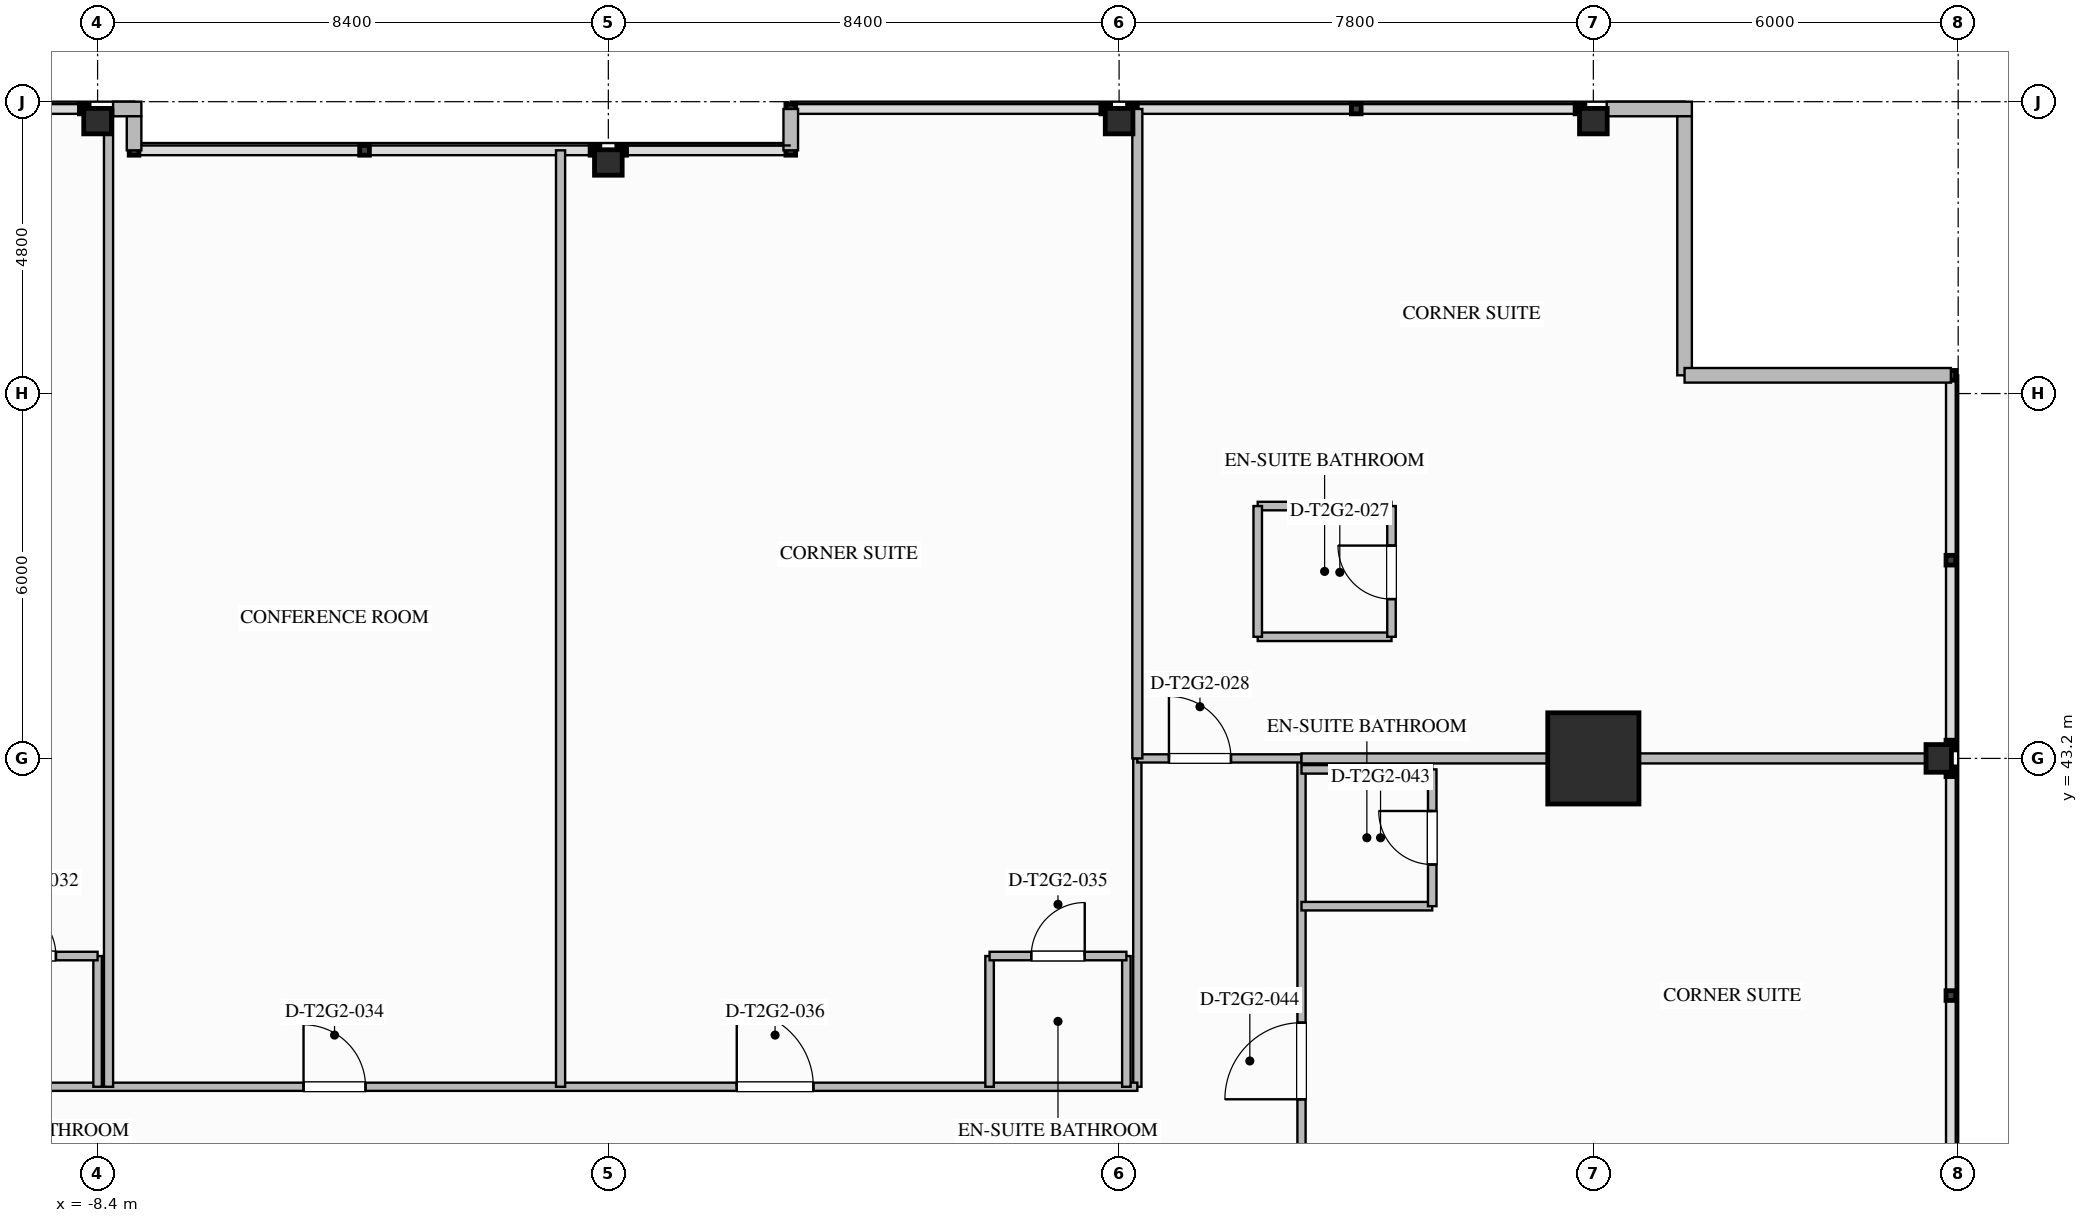
"""IFC4 building model, lengths in metres.
Left out: names, types, materials, properties, quantities, classifications, styles, units other than length and angle.
Written with IfcOpenShell. Run it as: python <this file> out.ifc"""

import sys

from ifc_helpers import new_model, si_unit, direction, frame, frame_2d, origin, origin_2d, place, context, subcontext, project, spatial, rectangle, i_section, extrude, element, fill, save


model = new_model("IFC4")
c1 = context("Model", 3, precision=1e-05, world=origin(), true_north=direction((0.0, 1.0)))
c2 = subcontext(c1, "Body", "Model", "MODEL_VIEW")
j1 = project(units=[si_unit("LENGTHUNIT", "METRE"), si_unit("PLANEANGLEUNIT", "RADIAN")], contexts=[c1])
p1 = place(None, origin())
s1 = spatial("IfcSite", under=j1, at=p1, CompositionType="ELEMENT")
p2 = place(p1, origin())
s2 = spatial("IfcBuilding", under=s1, at=p2, CompositionType="ELEMENT")
p3 = place(p2, frame((0.0, 0.0, 102.3)))
s3 = spatial("IfcBuildingStorey", under=s2, at=p3, CompositionType="ELEMENT", Elevation=102.3)
p4 = place(p3, frame((16.2, 43.2, 0.0), z_axis=(0.0, 0.0, 1.0), x_axis=(1.0, 0.0, 0.0)))
e1 = element("IfcColumn", 1, at=p4, inside=s3, PredefinedType="COLUMN", context=c2, shape_type="SweptSolid", body=[
    extrude(rectangle(XDim=1.5, YDim=1.5, at=origin_2d()), origin(), (0.0, 0.0, 1.0), 3.5),
])
for number, where, z_axis, x_axis in (
    (2, (21.88, 43.2, 0.0), (0.0, 0.0, 1.0), (1.0, 0.0, 0.0)),
    (3, (-8.4, 53.68, 0.0), (0.0, 0.0, 1.0), (0.0, 1.0, 0.0)),
    (4, (0.0, 53.0, 0.0), (0.0, 0.0, 1.0), (0.0, 1.0, 0.0)),
    (5, (8.4, 53.68, 0.0), (0.0, 0.0, 1.0), (0.0, 1.0, 0.0)),
    (6, (16.2, 53.68, 0.0), (0.0, 0.0, 1.0), (0.0, 1.0, 0.0)),
):
    element("IfcColumn", number, at=place(p3, frame(where, z_axis=z_axis, x_axis=x_axis)), inside=s3, PredefinedType="COLUMN", context=c2, shape_type="SweptSolid", body=[
        extrude(i_section(OverallWidth=0.418, OverallDepth=0.455, WebThickness=0.042, FlangeThickness=0.068, FilletRadius=0.03, at=origin_2d()), origin(), (0.0, 0.0, 1.0), 3.497),
    ])
p5 = place(p3, frame((-8.145, 53.88, 0.0), z_axis=(0.0, 0.0, 1.0), x_axis=(1.0, 0.0, 0.0)))
e7 = element("IfcWall", 7, at=p5, inside=s3, PredefinedType="STANDARD", context=c2, shape_type="SweptSolid", body=[
    extrude(rectangle(XDim=0.465, YDim=0.24, at=frame_2d((0.232, 0.0))), origin(), (0.0, 0.0, 1.0), 3.24),
])
p6 = place(p3, frame((16.42, 53.88, 0.0), z_axis=(0.0, 0.0, 1.0), x_axis=(1.0, 0.0, 0.0)))
e8 = element("IfcWall", 8, at=p6, inside=s3, PredefinedType="STANDARD", context=c2, shape_type="SweptSolid", body=[
    extrude(rectangle(XDim=1.4, YDim=0.24, at=frame_2d((0.7, 0.0))), origin(), (0.0, 0.0, 1.0), 3.24),
])
p7 = place(p3, frame((17.7, 53.76, 0.0), z_axis=(0.0, 0.0, 1.0), x_axis=(0.0, -1.0, 0.0)))
e9 = element("IfcWall", 9, at=p7, inside=s3, PredefinedType="STANDARD", context=c2, shape_type="SweptSolid", body=[
    extrude(rectangle(XDim=4.26, YDim=0.24, at=frame_2d((2.13, 0.0))), origin(), (0.0, 0.0, 1.0), 3.24),
])
p8 = place(p3, frame((17.7, 49.5, 0.0), z_axis=(0.0, 0.0, 1.0), x_axis=(1.0, 0.0, 0.0)))
e10 = element("IfcWall", 10, at=p8, inside=s3, PredefinedType="STANDARD", context=c2, shape_type="SweptSolid", body=[
    extrude(rectangle(XDim=4.38, YDim=0.24, at=frame_2d((2.19, 0.0))), origin(), (0.0, 0.0, 1.0), 3.24),
])
p9 = place(p3, frame((-7.8, 53.76, 0.0), z_axis=(0.0, 0.0, 1.0), x_axis=(0.0, -1.0, 0.0)))
e11 = element("IfcWall", 11, at=p9, inside=s3, PredefinedType="STANDARD", context=c2, shape_type="SweptSolid", body=[
    extrude(rectangle(XDim=0.56, YDim=0.24, at=frame_2d((0.28, 0.0))), origin(), (0.0, 0.0, 1.0), 3.24),
])
p10 = place(p3, frame((3.0, 53.2, 0.0), z_axis=(0.0, 0.0, 1.0), x_axis=(0.0, 1.0, 0.0)))
e12 = element("IfcWall", 12, at=p10, inside=s3, PredefinedType="STANDARD", context=c2, shape_type="SweptSolid", body=[
    extrude(rectangle(XDim=0.68, YDim=0.24, at=frame_2d((0.34, 0.0))), origin(), (0.0, 0.0, 1.0), 3.24),
])
p11 = place(p3, frame((8.7, 37.8, 0.0), z_axis=(0.0, 0.0, 1.0), x_axis=(0.0, 1.0, 0.0)))
e13 = element("IfcWall", 13, at=p11, inside=s3, PredefinedType="PARTITIONING", context=c2, shape_type="SweptSolid", body=[
    extrude(rectangle(XDim=5.4, YDim=0.135, at=frame_2d((2.7, 0.0))), origin(), (0.0, 0.0, 1.0), 3.24),
])
p12 = place(p3, frame((-16.2, 37.8, 0.0), z_axis=(0.0, 0.0, 1.0), x_axis=(1.0, 0.0, 0.0)))
e14 = element("IfcWall", 14, at=p12, inside=s3, PredefinedType="PARTITIONING", context=c2, shape_type="SweptSolid", body=[
    extrude(rectangle(XDim=24.9, YDim=0.135, at=frame_2d((12.45, 0.0))), origin(), (0.0, 0.0, 1.0), 3.24),
])
p13 = place(p12, frame((2.145, 0.0, 0.0)))
e15 = element("IfcOpeningElement", 15, at=p13, cuts=e14, PredefinedType="OPENING", context=c2, shape_type="SweptSolid", body=[
    extrude(rectangle(XDim=1.26, YDim=2.2, at=frame_2d((0.63, 1.1))), frame((0.0, 0.077, 0.0), z_axis=(0.0, -1.0, 0.0), x_axis=(1.0, 0.0, 0.0)), (0.0, 0.0, 1.0), 0.155),
])
p14 = place(p12, frame((11.187, 0.0, 0.0)))
e16 = element("IfcOpeningElement", 16, at=p14, cuts=e14, PredefinedType="OPENING", context=c2, shape_type="SweptSolid", body=[
    extrude(rectangle(XDim=1.02, YDim=2.15, at=frame_2d((0.51, 1.075))), frame((0.0, 0.077, 0.0), z_axis=(0.0, -1.0, 0.0), x_axis=(1.0, 0.0, 0.0)), (0.0, 0.0, 1.0), 0.155),
])
p15 = place(p12, frame((18.312, 0.0, 0.0)))
e17 = element("IfcOpeningElement", 17, at=p15, cuts=e14, PredefinedType="OPENING", context=c2, shape_type="SweptSolid", body=[
    extrude(rectangle(XDim=1.26, YDim=2.2, at=frame_2d((0.63, 1.1))), frame((0.0, 0.077, 0.0), z_axis=(0.0, -1.0, 0.0), x_axis=(1.0, 0.0, 0.0)), (0.0, 0.0, 1.0), 0.155),
])
p16 = place(p3, frame((11.4, 10.8, 0.0), z_axis=(0.0, 0.0, 1.0), x_axis=(0.0, 1.0, 0.0)))
e18 = element("IfcWall", 18, at=p16, inside=s3, PredefinedType="PARTITIONING", context=c2, shape_type="SweptSolid", body=[
    extrude(rectangle(XDim=32.4, YDim=0.135, at=frame_2d((16.2, 0.0))), origin(), (0.0, 0.0, 1.0), 3.24),
])
p17 = place(p16, frame((2.494, 0.0, 0.0)))
e19 = element("IfcOpeningElement", 19, at=p17, cuts=e18, PredefinedType="OPENING", context=c2, shape_type="SweptSolid", body=[
    extrude(rectangle(XDim=1.26, YDim=2.2, at=frame_2d((0.63, 1.1))), frame((0.0, 0.077, 0.0), z_axis=(0.0, -1.0, 0.0), x_axis=(1.0, 0.0, 0.0)), (0.0, 0.0, 1.0), 0.155),
])
p18 = place(p16, frame((10.305, 0.0, 0.0)))
e20 = element("IfcOpeningElement", 20, at=p18, cuts=e18, PredefinedType="OPENING", context=c2, shape_type="SweptSolid", body=[
    extrude(rectangle(XDim=1.26, YDim=2.2, at=frame_2d((0.63, 1.1))), frame((0.0, 0.077, 0.0), z_axis=(0.0, -1.0, 0.0), x_axis=(1.0, 0.0, 0.0)), (0.0, 0.0, 1.0), 0.155),
])
p19 = place(p16, frame((18.405, 0.0, 0.0)))
e21 = element("IfcOpeningElement", 21, at=p19, cuts=e18, PredefinedType="OPENING", context=c2, shape_type="SweptSolid", body=[
    extrude(rectangle(XDim=1.26, YDim=2.2, at=frame_2d((0.63, 1.1))), frame((0.0, 0.077, 0.0), z_axis=(0.0, -1.0, 0.0), x_axis=(1.0, 0.0, 0.0)), (0.0, 0.0, 1.0), 0.155),
])
p20 = place(p16, frame((26.794, 0.0, 0.0)))
e22 = element("IfcOpeningElement", 22, at=p20, cuts=e18, PredefinedType="OPENING", context=c2, shape_type="SweptSolid", body=[
    extrude(rectangle(XDim=1.26, YDim=2.2, at=frame_2d((0.63, 1.1))), frame((0.0, 0.077, 0.0), z_axis=(0.0, -1.0, 0.0), x_axis=(1.0, 0.0, 0.0)), (0.0, 0.0, 1.0), 0.155),
])
p21 = place(p3, frame((8.7, 43.2, 0.0), z_axis=(0.0, 0.0, 1.0), x_axis=(1.0, 0.0, 0.0)))
e23 = element("IfcWall", 23, at=p21, inside=s3, PredefinedType="PARTITIONING", context=c2, shape_type="SweptSolid", body=[
    extrude(rectangle(XDim=2.7, YDim=0.135, at=frame_2d((1.35, 0.0))), origin(), (0.0, 0.0, 1.0), 2.452),
])
p22 = place(p21, frame((0.52, 0.0, 0.0)))
e24 = element("IfcOpeningElement", 24, at=p22, cuts=e23, PredefinedType="OPENING", context=c2, shape_type="SweptSolid", body=[
    extrude(rectangle(XDim=1.02, YDim=2.15, at=frame_2d((0.51, 1.075))), frame((0.0, 0.077, 0.0), z_axis=(0.0, -1.0, 0.0), x_axis=(1.0, 0.0, 0.0)), (0.0, 0.0, 1.0), 0.155),
])
p23 = place(p3, frame((8.7, 43.2, 0.0), z_axis=(0.0, 0.0, 1.0), x_axis=(0.0, 1.0, 0.0)))
e25 = element("IfcWall", 25, at=p23, inside=s3, PredefinedType="PARTITIONING", context=c2, shape_type="SweptSolid", body=[
    extrude(rectangle(XDim=10.68, YDim=0.165, at=frame_2d((5.34, 0.0))), origin(), (0.0, 0.0, 1.0), 2.452),
])
p24 = place(p3, frame((11.4, 43.2, 0.0), z_axis=(0.0, 0.0, 1.0), x_axis=(1.0, 0.0, 0.0)))
e26 = element("IfcWall", 26, at=p24, inside=s3, PredefinedType="PARTITIONING", context=c2, shape_type="SweptSolid", body=[
    extrude(rectangle(XDim=10.68, YDim=0.165, at=frame_2d((5.34, 0.0))), origin(), (0.0, 0.0, 1.0), 2.452),
])
for number, where, z_axis, x_axis in (
    (27, (10.68, 45.2, 0.0), (0.0, 0.0, 1.0), (1.0, 0.0, 0.0)),
    (28, (10.68, 47.35, 0.0), (0.0, 0.0, 1.0), (1.0, 0.0, 0.0)),
):
    element("IfcWall", number, at=place(p3, frame(where, z_axis=z_axis, x_axis=x_axis)), inside=s3, PredefinedType="PLUMBINGWALL", context=c2, shape_type="SweptSolid", body=[
        extrude(rectangle(XDim=2.2, YDim=0.14, at=frame_2d((1.1, 0.0))), origin(), (0.0, 0.0, 1.0), 3.24),
    ])
p25 = place(p3, frame((10.68, 45.2, 0.0), z_axis=(0.0, 0.0, 1.0), x_axis=(0.0, 1.0, 0.0)))
e29 = element("IfcWall", 29, at=p25, inside=s3, PredefinedType="PLUMBINGWALL", context=c2, shape_type="SweptSolid", body=[
    extrude(rectangle(XDim=2.15, YDim=0.14, at=frame_2d((1.075, 0.0))), origin(), (0.0, 0.0, 1.0), 3.24),
])
p26 = place(p3, frame((12.88, 45.2, 0.0), z_axis=(0.0, 0.0, 1.0), x_axis=(0.0, 1.0, 0.0)))
e30 = element("IfcWall", 30, at=p26, inside=s3, PredefinedType="PLUMBINGWALL", context=c2, shape_type="SweptSolid", body=[
    extrude(rectangle(XDim=2.15, YDim=0.14, at=frame_2d((1.075, 0.0))), origin(), (0.0, 0.0, 1.0), 3.24),
])
p27 = place(p26, frame((0.62, 0.0, 0.0)))
e31 = element("IfcOpeningElement", 31, at=p27, cuts=e30, PredefinedType="OPENING", context=c2, shape_type="SweptSolid", body=[
    extrude(rectangle(XDim=0.88, YDim=2.1, at=frame_2d((0.44, 1.05))), frame((0.0, 0.08, 0.0), z_axis=(0.0, -1.0, 0.0), x_axis=(1.0, 0.0, 0.0)), (0.0, 0.0, 1.0), 0.16),
])
p28 = place(p3, frame((-8.4, 37.8, 0.0), z_axis=(0.0, 0.0, 1.0), x_axis=(0.0, 1.0, 0.0)))
e32 = element("IfcWall", 32, at=p28, inside=s3, PredefinedType="PLUMBINGWALL", context=c2, shape_type="SweptSolid", body=[
    extrude(rectangle(XDim=2.15, YDim=0.14, at=frame_2d((1.075, 0.0))), origin(), (0.0, 0.0, 1.0), 2.617),
])
p29 = place(p3, frame((-10.65, 39.95, 0.0), z_axis=(0.0, 0.0, 1.0), x_axis=(1.0, 0.0, 0.0)))
e33 = element("IfcWall", 33, at=p29, inside=s3, PredefinedType="PLUMBINGWALL", context=c2, shape_type="SweptSolid", body=[
    extrude(rectangle(XDim=2.25, YDim=0.14, at=frame_2d((1.125, 0.0))), origin(), (0.0, 0.0, 1.0), 3.24),
])
p30 = place(p29, frame((0.685, 0.0, 0.0)))
e34 = element("IfcOpeningElement", 34, at=p30, cuts=e33, PredefinedType="OPENING", context=c2, shape_type="SweptSolid", body=[
    extrude(rectangle(XDim=0.88, YDim=2.1, at=frame_2d((0.44, 1.05))), frame((0.0, 0.08, 0.0), z_axis=(0.0, -1.0, 0.0), x_axis=(1.0, 0.0, 0.0)), (0.0, 0.0, 1.0), 0.16),
])
p31 = place(p3, frame((-8.22, 37.8, 0.0), z_axis=(0.0, 0.0, 1.0), x_axis=(0.0, 1.0, 0.0)))
e35 = element("IfcWall", 35, at=p31, inside=s3, PredefinedType="PARTITIONING", context=c2, shape_type="SweptSolid", body=[
    extrude(rectangle(XDim=16.08, YDim=0.15, at=frame_2d((8.04, 0.0))), origin(), (0.0, 0.0, 1.0), 2.452),
])
p32 = place(p3, frame((-0.786, 37.8, 0.0), z_axis=(0.0, 0.0, 1.0), x_axis=(0.0, 1.0, 0.0)))
e36 = element("IfcWall", 36, at=p32, inside=s3, PredefinedType="PARTITIONING", context=c2, shape_type="SweptSolid", body=[
    extrude(rectangle(XDim=15.4, YDim=0.15, at=frame_2d((7.7, 0.0))), origin(), (0.0, 0.0, 1.0), 3.24),
])
p33 = place(p3, frame((6.27, 37.8, 0.0), z_axis=(0.0, 0.0, 1.0), x_axis=(0.0, 1.0, 0.0)))
e37 = element("IfcWall", 37, at=p33, inside=s3, PredefinedType="PLUMBINGWALL", context=c2, shape_type="SweptSolid", body=[
    extrude(rectangle(XDim=2.15, YDim=0.14, at=frame_2d((1.075, 0.0))), origin(), (0.0, 0.0, 1.0), 3.24),
])
p34 = place(p3, frame((8.52, 37.8, 0.0), z_axis=(0.0, 0.0, 1.0), x_axis=(0.0, 1.0, 0.0)))
e38 = element("IfcWall", 38, at=p34, inside=s3, PredefinedType="PLUMBINGWALL", context=c2, shape_type="SweptSolid", body=[
    extrude(rectangle(XDim=2.15, YDim=0.14, at=frame_2d((1.075, 0.0))), origin(), (0.0, 0.0, 1.0), 2.617),
])
p35 = place(p3, frame((6.27, 39.95, 0.0), z_axis=(0.0, 0.0, 1.0), x_axis=(1.0, 0.0, 0.0)))
e39 = element("IfcWall", 39, at=p35, inside=s3, PredefinedType="PLUMBINGWALL", context=c2, shape_type="SweptSolid", body=[
    extrude(rectangle(XDim=2.25, YDim=0.14, at=frame_2d((1.125, 0.0))), origin(), (0.0, 0.0, 1.0), 3.24),
])
p36 = place(p35, frame((0.685, 0.0, 0.0)))
e40 = element("IfcOpeningElement", 40, at=p36, cuts=e39, PredefinedType="OPENING", context=c2, shape_type="SweptSolid", body=[
    extrude(rectangle(XDim=0.88, YDim=2.1, at=frame_2d((0.44, 1.05))), frame((0.0, 0.08, 0.0), z_axis=(0.0, -1.0, 0.0), x_axis=(1.0, 0.0, 0.0)), (0.0, 0.0, 1.0), 0.16),
])
p37 = place(p3, frame((11.4, 40.77, 0.0), z_axis=(0.0, 0.0, 1.0), x_axis=(1.0, 0.0, 0.0)))
e41 = element("IfcWall", 41, at=p37, inside=s3, PredefinedType="PLUMBINGWALL", context=c2, shape_type="SweptSolid", body=[
    extrude(rectangle(XDim=2.15, YDim=0.14, at=frame_2d((1.075, 0.0))), origin(), (0.0, 0.0, 1.0), 3.24),
])
p38 = place(p3, frame((11.4, 43.02, 0.0), z_axis=(0.0, 0.0, 1.0), x_axis=(1.0, 0.0, 0.0)))
e42 = element("IfcWall", 42, at=p38, inside=s3, PredefinedType="PLUMBINGWALL", context=c2, shape_type="SweptSolid", body=[
    extrude(rectangle(XDim=2.15, YDim=0.14, at=frame_2d((1.075, 0.0))), origin(), (0.0, 0.0, 1.0), 2.452),
])
p39 = place(p3, frame((13.55, 40.77, 0.0), z_axis=(0.0, 0.0, 1.0), x_axis=(0.0, 1.0, 0.0)))
e43 = element("IfcWall", 43, at=p39, inside=s3, PredefinedType="PLUMBINGWALL", context=c2, shape_type="SweptSolid", body=[
    extrude(rectangle(XDim=2.25, YDim=0.14, at=frame_2d((1.125, 0.0))), origin(), (0.0, 0.0, 1.0), 3.24),
])
p40 = place(p39, frame((0.685, 0.0, 0.0)))
e44 = element("IfcOpeningElement", 44, at=p40, cuts=e43, PredefinedType="OPENING", context=c2, shape_type="SweptSolid", body=[
    extrude(rectangle(XDim=0.88, YDim=2.1, at=frame_2d((0.44, 1.05))), frame((0.0, 0.08, 0.0), z_axis=(0.0, -1.0, 0.0), x_axis=(1.0, 0.0, 0.0)), (0.0, 0.0, 1.0), 0.16),
])
p41 = place(p27, origin())
e45 = element("IfcDoor", 45, at=p41, inside=s3, OperationType="SINGLE_SWING_RIGHT", PredefinedType="DOOR", context=c2, shape_type="SweptSolid", body=[
    extrude(rectangle(XDim=0.88, YDim=2.1, at=frame_2d((0.44, 1.05))), frame((0.0, 0.025, 0.0), z_axis=(0.0, -1.0, 0.0), x_axis=(1.0, 0.0, 0.0)), (0.0, 0.0, 1.0), 0.05),
])
fill(e31, e45)
p42 = place(p22, origin())
e46 = element("IfcDoor", 46, at=p42, inside=s3, OperationType="SINGLE_SWING_LEFT", PredefinedType="DOOR", context=c2, shape_type="SweptSolid", body=[
    extrude(rectangle(XDim=1.02, YDim=2.15, at=frame_2d((0.51, 1.075))), frame((0.0, 0.025, 0.0), z_axis=(0.0, -1.0, 0.0), x_axis=(1.0, 0.0, 0.0)), (0.0, 0.0, 1.0), 0.05),
])
fill(e24, e46)
p43 = place(p30, origin())
e47 = element("IfcDoor", 47, at=p43, inside=s3, OperationType="SINGLE_SWING_LEFT", PredefinedType="DOOR", context=c2, shape_type="SweptSolid", body=[
    extrude(rectangle(XDim=0.88, YDim=2.1, at=frame_2d((0.44, 1.05))), frame((0.0, 0.025, 0.0), z_axis=(0.0, -1.0, 0.0), x_axis=(1.0, 0.0, 0.0)), (0.0, 0.0, 1.0), 0.05),
])
fill(e34, e47)
p44 = place(p14, origin())
e48 = element("IfcDoor", 48, at=p44, inside=s3, OperationType="SINGLE_SWING_LEFT", PredefinedType="DOOR", context=c2, shape_type="SweptSolid", body=[
    extrude(rectangle(XDim=1.02, YDim=2.15, at=frame_2d((0.51, 1.075))), frame((0.0, 0.025, 0.0), z_axis=(0.0, -1.0, 0.0), x_axis=(1.0, 0.0, 0.0)), (0.0, 0.0, 1.0), 0.05),
])
fill(e16, e48)
p45 = place(p36, origin())
e49 = element("IfcDoor", 49, at=p45, inside=s3, OperationType="SINGLE_SWING_RIGHT", PredefinedType="DOOR", context=c2, shape_type="SweptSolid", body=[
    extrude(rectangle(XDim=0.88, YDim=2.1, at=frame_2d((0.44, 1.05))), frame((0.0, 0.025, 0.0), z_axis=(0.0, -1.0, 0.0), x_axis=(1.0, 0.0, 0.0)), (0.0, 0.0, 1.0), 0.05),
])
fill(e40, e49)
p46 = place(p15, origin())
e50 = element("IfcDoor", 50, at=p46, inside=s3, OperationType="SINGLE_SWING_LEFT", PredefinedType="DOOR", context=c2, shape_type="SweptSolid", body=[
    extrude(rectangle(XDim=1.26, YDim=2.2, at=frame_2d((0.63, 1.1))), frame((0.0, 0.025, 0.0), z_axis=(0.0, -1.0, 0.0), x_axis=(1.0, 0.0, 0.0)), (0.0, 0.0, 1.0), 0.05),
])
fill(e17, e50)
p47 = place(p40, origin())
e51 = element("IfcDoor", 51, at=p47, inside=s3, OperationType="SINGLE_SWING_RIGHT", PredefinedType="DOOR", context=c2, shape_type="SweptSolid", body=[
    extrude(rectangle(XDim=0.88, YDim=2.1, at=frame_2d((0.44, 1.05))), frame((0.0, 0.025, 0.0), z_axis=(0.0, -1.0, 0.0), x_axis=(1.0, 0.0, 0.0)), (0.0, 0.0, 1.0), 0.05),
])
fill(e44, e51)
p48 = place(p20, origin())
e52 = element("IfcDoor", 52, at=p48, inside=s3, OperationType="SINGLE_SWING_LEFT", PredefinedType="DOOR", context=c2, shape_type="SweptSolid", body=[
    extrude(rectangle(XDim=1.26, YDim=2.2, at=frame_2d((0.63, 1.1))), frame((0.0, 0.025, 0.0), z_axis=(0.0, -1.0, 0.0), x_axis=(1.0, 0.0, 0.0)), (0.0, 0.0, 1.0), 0.05),
])
fill(e22, e52)
save(model, sys.argv[1])
